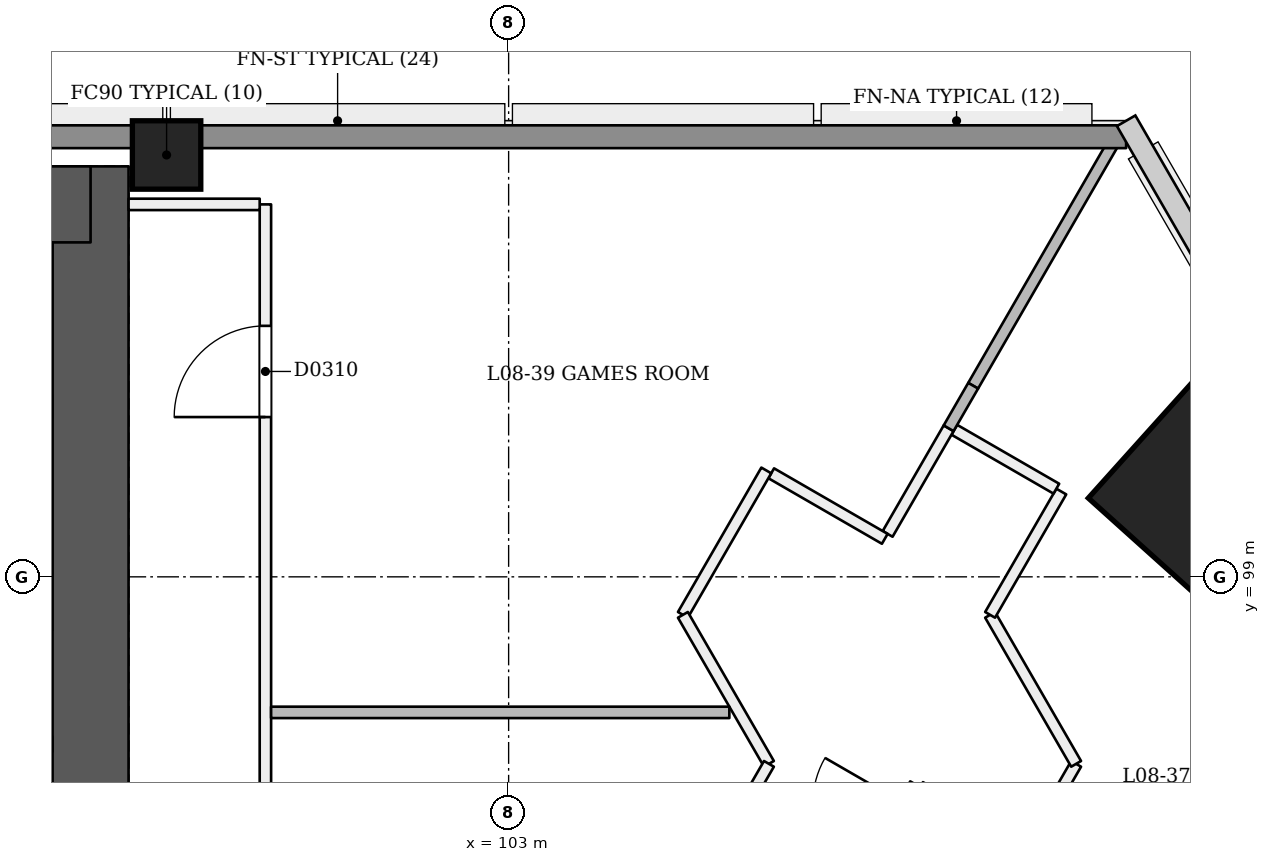
"""IFC4 building model, lengths in metres.
Left out: names, types, materials, properties, quantities, classifications, styles, units other than length and angle.
Written with IfcOpenShell. Run it as: python <this file> out.ifc"""

import sys

from ifc_helpers import new_model, si_unit, direction, frame, frame_2d, origin, origin_2d, place, context, subcontext, project, spatial, rectangle, extrude, element, fill, save


model = new_model("IFC4")
c1 = context("Model", 3, precision=1e-05, world=origin(), true_north=direction((0.0, 1.0)))
c2 = subcontext(c1, "Body", "Model", "MODEL_VIEW")
j1 = project(units=[si_unit("LENGTHUNIT", "METRE"), si_unit("PLANEANGLEUNIT", "RADIAN")], contexts=[c1])
p1 = place(None, origin())
s1 = spatial("IfcSite", under=j1, at=p1, CompositionType="ELEMENT")
p2 = place(p1, origin())
s2 = spatial("IfcBuilding", under=s1, at=p2, CompositionType="ELEMENT")
p3 = place(p2, frame((0.0, 0.0, 37.8)))
s3 = spatial("IfcBuildingStorey", under=s2, at=p3, CompositionType="ELEMENT", Elevation=37.8)
p4 = place(p3, frame((97.5, 92.9, 0.0), z_axis=(0.0, 0.0, 1.0), x_axis=(0.0, 1.0, 0.0)))
e1 = element("IfcWall", 1, at=p4, inside=s3, PredefinedType="SHEAR", context=c2, shape_type="SweptSolid", body=[
    extrude(rectangle(XDim=11.5, YDim=1.0, at=frame_2d((5.75, 0.0))), origin(), (0.0, 0.0, 1.0), 3.6),
])
p5 = place(p3, frame((97.5, 103.9, 0.0), z_axis=(0.0, 0.0, 1.0), x_axis=(-1.0, 0.0, 0.0)))
e2 = element("IfcWall", 2, at=p5, inside=s3, PredefinedType="SHEAR", context=c2, shape_type="SweptSolid", body=[
    extrude(rectangle(XDim=25.5, YDim=1.0, at=frame_2d((12.75, 0.0))), origin(), (0.0, 0.0, 1.0), 3.6),
])
p6 = place(p3, frame((112.44, 100.12, 0.0), z_axis=(-0.028403739082, 0.009219352065, 0.999554016126), x_axis=(0.500759903992, -0.865301216656, 0.022210875906)))
e3 = element("IfcColumn", 3, at=p6, inside=s3, PredefinedType="COLUMN", context=c2, shape_type="SweptSolid", body=[
    extrude(rectangle(XDim=2.52, YDim=2.52, at=origin_2d()), origin(), (0.0, 0.0, 1.0), 3.602),
])
p7 = place(p3, frame((98.5, 104.55, 0.0), z_axis=(0.0, 0.0, 1.0), x_axis=(1.0, 0.0, 0.0)))
e4 = element("IfcColumn", 4, at=p7, inside=s3, PredefinedType="COLUMN", context=c2, shape_type="SweptSolid", body=[
    extrude(rectangle(XDim=0.9, YDim=0.9, at=origin_2d()), origin(), (0.0, 0.0, 1.0), 3.6),
])
p8 = place(p3, frame((107.048, 94.02, 0.0), z_axis=(0.0, 0.0, 1.0), x_axis=(0.500006934395, 0.866021400173, 0.0)))
e5 = element("IfcWall", 5, at=p8, inside=s3, PredefinedType="PARTITIONING", context=c2, shape_type="SweptSolid", body=[
    extrude(rectangle(XDim=2.6, YDim=0.15, at=frame_2d((1.3, 0.0))), origin(), (0.0, 0.0, 1.0), 3.1),
])
p9 = place(p8, frame((1.107, 0.0, 0.0)))
e6 = element("IfcOpeningElement", 6, at=p9, cuts=e5, PredefinedType="OPENING", context=c2, shape_type="SweptSolid", body=[
    extrude(rectangle(XDim=1.2, YDim=2.1, at=frame_2d((0.6, 1.05))), frame((0.0, 0.085, 0.0), z_axis=(0.0, -1.0, 0.0), x_axis=(1.0, 0.0, 0.0)), (0.0, 0.0, 1.0), 0.171),
])
p10 = place(p3, frame((108.413, 96.234, 0.0), z_axis=(0.0, 0.0, 1.0), x_axis=(0.866015446554, -0.500017246033, 0.0)))
e7 = element("IfcWall", 7, at=p10, inside=s3, PredefinedType="PARTITIONING", context=c2, shape_type="SweptSolid", body=[
    extrude(rectangle(XDim=1.625, YDim=0.15, at=frame_2d((0.812, 0.0))), origin(), (0.0, 0.0, 1.0), 3.1),
])
p11 = place(p3, frame((109.858, 95.487, 0.0), z_axis=(0.0, 0.0, 1.0), x_axis=(0.499983176524, 0.866035116605, 0.0)))
e8 = element("IfcWall", 8, at=p11, inside=s3, PredefinedType="PARTITIONING", context=c2, shape_type="SweptSolid", body=[
    extrude(rectangle(XDim=1.216, YDim=0.15, at=frame_2d((0.608, 0.0))), origin(), (0.0, 0.0, 1.0), 3.1),
])
p12 = place(p3, frame((110.466, 96.54, 0.0), z_axis=(0.0, 0.0, 1.0), x_axis=(-0.500036781429, 0.866004166975, 0.0)))
e9 = element("IfcWall", 9, at=p12, inside=s3, PredefinedType="PARTITIONING", context=c2, shape_type="SweptSolid", body=[
    extrude(rectangle(XDim=2.263, YDim=0.15, at=frame_2d((1.132, 0.0))), origin(), (0.0, 0.0, 1.0), 3.1),
])
p13 = place(p3, frame((109.334, 98.5, 0.0), z_axis=(0.0, 0.0, 1.0), x_axis=(0.499951854219, 0.86605319898, 0.0)))
e10 = element("IfcWall", 10, at=p13, inside=s3, PredefinedType="PARTITIONING", context=c2, shape_type="SweptSolid", body=[
    extrude(rectangle(XDim=1.873, YDim=0.15, at=frame_2d((0.937, 0.0))), origin(), (0.0, 0.0, 1.0), 3.1),
])
p14 = place(p3, frame((110.206, 100.16, 0.0), z_axis=(0.0, 0.0, 1.0), x_axis=(-0.865975732936, 0.500086022567, 0.0)))
e11 = element("IfcWall", 11, at=p14, inside=s3, PredefinedType="PARTITIONING", context=c2, shape_type="SweptSolid", body=[
    extrude(rectangle(XDim=1.55, YDim=0.15, at=frame_2d((0.775, 0.0))), origin(), (0.0, 0.0, 1.0), 2.6),
])
p15 = place(p3, frame((99.8, 92.4, 0.0), z_axis=(0.0, 0.0, 1.0), x_axis=(0.0, 1.0, 0.0)))
e12 = element("IfcWall", 12, at=p15, inside=s3, PredefinedType="PARTITIONING", context=c2, shape_type="SweptSolid", body=[
    extrude(rectangle(XDim=11.5, YDim=0.15, at=frame_2d((5.75, 0.0))), origin(), (0.0, 0.0, 1.0), 2.6),
])
p16 = place(p15, frame((8.702, 0.0, 0.0)))
e13 = element("IfcOpeningElement", 13, at=p16, cuts=e12, PredefinedType="OPENING", context=c2, shape_type="SweptSolid", body=[
    extrude(rectangle(XDim=1.2, YDim=2.1, at=frame_2d((0.6, 1.05))), frame((0.0, 0.085, 0.0), z_axis=(0.0, -1.0, 0.0), x_axis=(1.0, 0.0, 0.0)), (0.0, 0.0, 1.0), 0.171),
])
p17 = place(p15, frame((2.087, 0.0, 0.0)))
e14 = element("IfcOpeningElement", 14, at=p17, cuts=e12, PredefinedType="OPENING", context=c2, shape_type="SweptSolid", body=[
    extrude(rectangle(XDim=1.0, YDim=2.1, at=frame_2d((0.5, 1.05))), frame((0.0, 0.085, 0.0), z_axis=(0.0, -1.0, 0.0), x_axis=(1.0, 0.0, 0.0)), (0.0, 0.0, 1.0), 0.171),
])
p18 = place(p3, frame((99.725, 103.9, 0.0), z_axis=(0.0, 0.0, 1.0), x_axis=(-1.0, 0.0, 0.0)))
e15 = element("IfcWall", 15, at=p18, inside=s3, PredefinedType="PARTITIONING", context=c2, shape_type="SweptSolid", body=[
    extrude(rectangle(XDim=1.725, YDim=0.15, at=frame_2d((0.863, 0.0))), origin(), (0.0, 0.0, 1.0), 2.6),
])
p19 = place(p3, frame((108.789, 100.955, 0.0), z_axis=(0.0, 0.0, 1.0), x_axis=(-0.500016533484, -0.866015857963, 0.0)))
e16 = element("IfcWall", 16, at=p19, inside=s3, PredefinedType="PARTITIONING", context=c2, shape_type="SweptSolid", body=[
    extrude(rectangle(XDim=1.605, YDim=0.15, at=frame_2d((0.802, 0.0))), origin(), (0.0, 0.0, 1.0), 3.1),
])
p20 = place(p3, frame((107.949, 99.5, 0.0), z_axis=(0.0, 0.0, 1.0), x_axis=(-0.866013532718, 0.500020560727, 0.0)))
e17 = element("IfcWall", 17, at=p20, inside=s3, PredefinedType="PARTITIONING", context=c2, shape_type="SweptSolid", body=[
    extrude(rectangle(XDim=1.725, YDim=0.15, at=frame_2d((0.863, 0.0))), origin(), (0.0, 0.0, 1.0), 3.1),
])
p21 = place(p3, frame((106.39, 100.4, 0.0), z_axis=(0.0, 0.0, 1.0), x_axis=(-0.500005024956, -0.866022502605, 0.0)))
e18 = element("IfcWall", 18, at=p21, inside=s3, PredefinedType="PARTITIONING", context=c2, shape_type="SweptSolid", body=[
    extrude(rectangle(XDim=2.194, YDim=0.15, at=frame_2d((1.097, 0.0))), origin(), (0.0, 0.0, 1.0), 3.1),
])
p22 = place(p3, frame((105.293, 98.5, 0.0), z_axis=(0.0, 0.0, 1.0), x_axis=(0.500036781429, -0.866004166975, 0.0)))
e19 = element("IfcWall", 19, at=p22, inside=s3, PredefinedType="PARTITIONING", context=c2, shape_type="SweptSolid", body=[
    extrude(rectangle(XDim=2.263, YDim=0.15, at=frame_2d((1.132, 0.0))), origin(), (0.0, 0.0, 1.0), 3.1),
])
p23 = place(p3, frame((106.425, 96.54, 0.0), z_axis=(0.0, 0.0, 1.0), x_axis=(-0.499995077365, -0.86602824585, 0.0)))
e20 = element("IfcWall", 20, at=p23, inside=s3, PredefinedType="PARTITIONING", context=c2, shape_type="SweptSolid", body=[
    extrude(rectangle(XDim=4.78, YDim=0.15, at=frame_2d((2.39, 0.0))), origin(), (0.0, 0.0, 1.0), 3.1),
])
p24 = place(p3, frame((111.066, 104.9, 0.0), z_axis=(0.0, 0.0, 1.0), x_axis=(-0.500014353419, -0.866017116675, 0.0)))
e21 = element("IfcWall", 21, at=p24, inside=s3, PredefinedType="PARTITIONING", context=c2, shape_type="SweptSolid", body=[
    extrude(rectangle(XDim=3.91, YDim=0.15, at=frame_2d((1.955, 0.0))), origin(), (0.0, 0.0, 1.0), 3.1),
])
p25 = place(p3, frame((109.112, 101.514, 0.0), z_axis=(0.0, 0.0, 1.0), x_axis=(-0.500082362009, -0.865977846834, 0.0)))
e22 = element("IfcWall", 22, at=p25, inside=s3, PredefinedType="PARTITIONING", context=c2, shape_type="SweptSolid", body=[
    extrude(rectangle(XDim=0.646, YDim=0.15, at=frame_2d((0.323, 0.0))), origin(), (0.0, 0.0, 1.0), 2.6),
])
p26 = place(p3, frame((99.875, 97.217, 0.0), z_axis=(0.0, 0.0, 1.0), x_axis=(1.0, 0.0, 0.0)))
e23 = element("IfcWall", 23, at=p26, inside=s3, PredefinedType="PARTITIONING", context=c2, shape_type="SweptSolid", body=[
    extrude(rectangle(XDim=6.029, YDim=0.15, at=frame_2d((3.014, 0.0))), origin(), (0.0, 0.0, 1.0), 3.1),
])
p27 = place(p3, frame((58.876, 104.79, 0.0), z_axis=(0.0, 0.0, 1.0), x_axis=(1.0, 0.0, 0.0)))
e24 = element("IfcWall", 24, at=p27, inside=s3, PredefinedType="SOLIDWALL", context=c2, shape_type="SweptSolid", body=[
    extrude(rectangle(XDim=52.248, YDim=0.3, at=frame_2d((26.124, 0.0))), origin(), (0.0, 0.0, 1.0), 2.6),
])
p28 = place(p16, origin())
e25 = element("IfcDoor", 25, at=p28, inside=s3, OperationType="SINGLE_SWING_LEFT", PredefinedType="NOTDEFINED", context=c2, shape_type="SweptSolid", body=[
    extrude(rectangle(XDim=1.2, YDim=2.1, at=frame_2d((0.6, 1.05))), frame((0.0, 0.025, 0.0), z_axis=(0.0, -1.0, 0.0), x_axis=(1.0, 0.0, 0.0)), (0.0, 0.0, 1.0), 0.05),
])
fill(e13, e25)
save(model, sys.argv[1])
